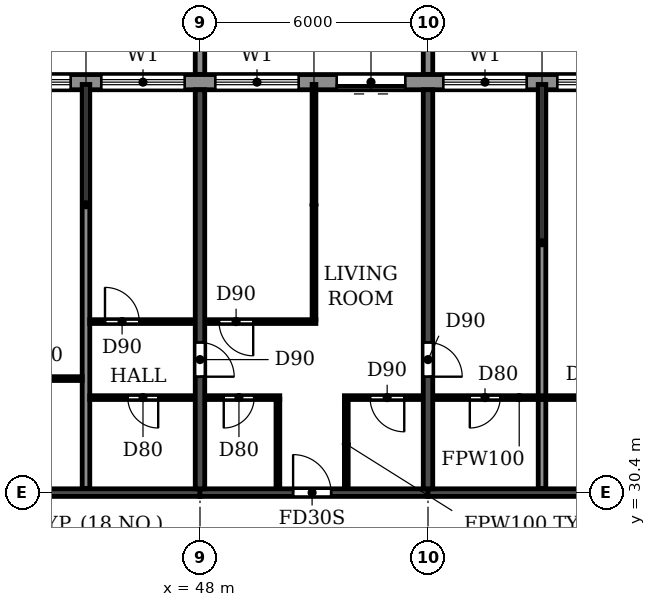
"""IFC4 building model, lengths in metres.
Left out: names, types, materials, properties, quantities, classifications, styles, units other than length and angle.
Written with IfcOpenShell. Run it as: python <this file> out.ifc"""

import sys

from ifc_helpers import new_model, si_unit, direction, frame, frame_2d, origin, place, context, subcontext, project, spatial, polyline, rectangle, outline, extrude, source, transform, mapped, element, fill, save


model = new_model("IFC4")
c1 = context("Model", 3, precision=1e-05, world=origin(), true_north=direction((0.0, 1.0)))
c2 = subcontext(c1, "Body", "Model", "MODEL_VIEW")
j1 = project(units=[si_unit("LENGTHUNIT", "METRE"), si_unit("PLANEANGLEUNIT", "RADIAN")], contexts=[c1])
p1 = place(None, origin())
s1 = spatial("IfcSite", under=j1, at=p1, CompositionType="ELEMENT")
p2 = place(p1, origin())
s2 = spatial("IfcBuilding", under=s1, at=p2, CompositionType="ELEMENT")
p3 = place(p2, frame((0.0, 0.0, 201.6)))
s3 = spatial("IfcBuildingStorey", under=s2, at=p3, CompositionType="ELEMENT", Elevation=201.6)
p4 = place(p3, frame((48.0, 30.5, 0.0), z_axis=(0.0, 0.0, 1.0), x_axis=(0.0, 1.0, 0.0)))
e1 = element("IfcWall", 1, at=p4, inside=s3, PredefinedType="SHEAR", context=c2, shape_type="SweptSolid", body=[
    extrude(rectangle(XDim=10.5, YDim=0.25, at=frame_2d((5.25, 0.0))), origin(), (0.0, 0.0, 1.0), 3.08),
])
p5 = place(p4, frame((2.95, 0.0, 0.0)))
e2 = element("IfcOpeningElement", 2, at=p5, cuts=e1, PredefinedType="OPENING", context=c2, shape_type="SweptSolid", body=[
    extrude(rectangle(XDim=0.9, YDim=2.1, at=frame_2d((0.45, 1.05))), frame((0.0, 0.135, 0.0), z_axis=(0.0, -1.0, 0.0), x_axis=(1.0, 0.0, 0.0)), (0.0, 0.0, 1.0), 0.27),
])
p6 = place(p3, frame((54.0, 30.5, 0.0), z_axis=(0.0, 0.0, 1.0), x_axis=(0.0, 1.0, 0.0)))
e3 = element("IfcWall", 3, at=p6, inside=s3, PredefinedType="SHEAR", context=c2, shape_type="SweptSolid", body=[
    extrude(rectangle(XDim=10.5, YDim=0.25, at=frame_2d((5.25, 0.0))), origin(), (0.0, 0.0, 1.0), 3.08),
])
p7 = place(p6, frame((2.95, 0.0, 0.0)))
e4 = element("IfcOpeningElement", 4, at=p7, cuts=e3, PredefinedType="OPENING", context=c2, shape_type="SweptSolid", body=[
    extrude(rectangle(XDim=0.9, YDim=2.1, at=frame_2d((0.45, 1.05))), frame((0.0, 0.135, 0.0), z_axis=(0.0, -1.0, 0.0), x_axis=(1.0, 0.0, 0.0)), (0.0, 0.0, 1.0), 0.27),
])
p8 = place(p3, frame((42.0, 30.4, 0.0), z_axis=(0.0, 0.0, 1.0), x_axis=(1.0, 0.0, 0.0)))
e5 = element("IfcWall", 5, at=p8, inside=s3, PredefinedType="SHEAR", context=c2, shape_type="SweptSolid", body=[
    extrude(rectangle(XDim=6.0, YDim=0.2, at=frame_2d((3.0, 0.0))), origin(), (0.0, 0.0, 1.0), 2.48),
])
p9 = place(p3, frame((48.0, 30.4, 0.0), z_axis=(0.0, 0.0, 1.0), x_axis=(1.0, 0.0, 0.0)))
e6 = element("IfcWall", 6, at=p9, inside=s3, PredefinedType="SHEAR", context=c2, shape_type="SweptSolid", body=[
    extrude(rectangle(XDim=6.0, YDim=0.2, at=frame_2d((3.0, 0.0))), origin(), (0.0, 0.0, 1.0), 2.48),
])
p10 = place(p9, frame((2.45, 0.0, 0.0)))
e7 = element("IfcOpeningElement", 7, at=p10, cuts=e6, PredefinedType="OPENING", context=c2, shape_type="SweptSolid", body=[
    extrude(rectangle(XDim=1.0, YDim=2.1, at=frame_2d((0.5, 1.05))), frame((0.0, 0.11, 0.0), z_axis=(0.0, -1.0, 0.0), x_axis=(1.0, 0.0, 0.0)), (0.0, 0.0, 1.0), 0.22),
])
p11 = place(p3, frame((54.0, 30.4, 0.0), z_axis=(0.0, 0.0, 1.0), x_axis=(1.0, 0.0, 0.0)))
e8 = element("IfcWall", 8, at=p11, inside=s3, PredefinedType="SHEAR", context=c2, shape_type="SweptSolid", body=[
    extrude(rectangle(XDim=6.0, YDim=0.2, at=frame_2d((3.0, 0.0))), origin(), (0.0, 0.0, 1.0), 2.48),
])
p12 = place(p3, frame((79.317, 41.2, 0.0), z_axis=(0.0, 0.0, 1.0), x_axis=(-1.0, 0.0, 0.0)))
e9 = element("IfcWall", 9, at=p12, inside=s3, PredefinedType="STANDARD", context=c2, shape_type="SweptSolid", body=[
    extrude(rectangle(XDim=56.634, YDim=0.4, at=frame_2d((28.317, 0.0))), origin(), (0.0, 0.0, 1.0), 3.08),
])
p13 = place(p12, frame((52.717, 0.0, 0.9)))
e10 = element("IfcOpeningElement", 10, at=p13, cuts=e9, PredefinedType="OPENING", context=c2, shape_type="SweptSolid", body=[
    extrude(rectangle(XDim=2.2, YDim=1.5, at=frame_2d((1.1, 0.75))), frame((0.0, 0.21, 0.0), z_axis=(0.0, -1.0, 0.0), x_axis=(1.0, 0.0, 0.0)), (0.0, 0.0, 1.0), 0.42),
])
p14 = place(p12, frame((49.917, 0.0, 0.0)))
e11 = element("IfcOpeningElement", 11, at=p14, cuts=e9, PredefinedType="OPENING", context=c2, shape_type="SweptSolid", body=[
    extrude(rectangle(XDim=1.8, YDim=2.4, at=frame_2d((0.9, 1.2))), frame((0.0, 0.21, 0.0), z_axis=(0.0, -1.0, 0.0), x_axis=(1.0, 0.0, 0.0)), (0.0, 0.0, 1.0), 0.42),
])
p15 = place(p12, frame((46.717, 0.0, 0.9)))
e12 = element("IfcOpeningElement", 12, at=p15, cuts=e9, PredefinedType="OPENING", context=c2, shape_type="SweptSolid", body=[
    extrude(rectangle(XDim=2.2, YDim=1.5, at=frame_2d((1.1, 0.75))), frame((0.0, 0.21, 0.0), z_axis=(0.0, -1.0, 0.0), x_axis=(1.0, 0.0, 0.0)), (0.0, 0.0, 1.0), 0.42),
])
p16 = place(p12, frame((43.917, 0.0, 0.0)))
e13 = element("IfcOpeningElement", 13, at=p16, cuts=e9, PredefinedType="OPENING", context=c2, shape_type="SweptSolid", body=[
    extrude(rectangle(XDim=1.8, YDim=2.4, at=frame_2d((0.9, 1.2))), frame((0.0, 0.21, 0.0), z_axis=(0.0, -1.0, 0.0), x_axis=(1.0, 0.0, 0.0)), (0.0, 0.0, 1.0), 0.42),
])
p17 = place(p12, frame((40.917, 0.0, 0.0)))
e14 = element("IfcOpeningElement", 14, at=p17, cuts=e9, PredefinedType="OPENING", context=c2, shape_type="SweptSolid", body=[
    extrude(rectangle(XDim=1.8, YDim=2.4, at=frame_2d((0.9, 1.2))), frame((0.0, 0.21, 0.0), z_axis=(0.0, -1.0, 0.0), x_axis=(1.0, 0.0, 0.0)), (0.0, 0.0, 1.0), 0.42),
])
p18 = place(p12, frame((37.717, 0.0, 0.9)))
e15 = element("IfcOpeningElement", 15, at=p18, cuts=e9, PredefinedType="OPENING", context=c2, shape_type="SweptSolid", body=[
    extrude(rectangle(XDim=2.2, YDim=1.5, at=frame_2d((1.1, 0.75))), frame((0.0, 0.21, 0.0), z_axis=(0.0, -1.0, 0.0), x_axis=(1.0, 0.0, 0.0)), (0.0, 0.0, 1.0), 0.42),
])
p19 = place(p12, frame((34.717, 0.0, 0.9)))
e16 = element("IfcOpeningElement", 16, at=p19, cuts=e9, PredefinedType="OPENING", context=c2, shape_type="SweptSolid", body=[
    extrude(rectangle(XDim=2.2, YDim=1.5, at=frame_2d((1.1, 0.75))), frame((0.0, 0.21, 0.0), z_axis=(0.0, -1.0, 0.0), x_axis=(1.0, 0.0, 0.0)), (0.0, 0.0, 1.0), 0.42),
])
p20 = place(p12, frame((31.717, 0.0, 0.9)))
e17 = element("IfcOpeningElement", 17, at=p20, cuts=e9, PredefinedType="OPENING", context=c2, shape_type="SweptSolid", body=[
    extrude(rectangle(XDim=2.2, YDim=1.5, at=frame_2d((1.1, 0.75))), frame((0.0, 0.21, 0.0), z_axis=(0.0, -1.0, 0.0), x_axis=(1.0, 0.0, 0.0)), (0.0, 0.0, 1.0), 0.42),
])
p21 = place(p12, frame((28.717, 0.0, 0.9)))
e18 = element("IfcOpeningElement", 18, at=p21, cuts=e9, PredefinedType="OPENING", context=c2, shape_type="SweptSolid", body=[
    extrude(rectangle(XDim=2.2, YDim=1.5, at=frame_2d((1.1, 0.75))), frame((0.0, 0.21, 0.0), z_axis=(0.0, -1.0, 0.0), x_axis=(1.0, 0.0, 0.0)), (0.0, 0.0, 1.0), 0.42),
])
p22 = place(p12, frame((25.917, 0.0, 0.0)))
e19 = element("IfcOpeningElement", 19, at=p22, cuts=e9, PredefinedType="OPENING", context=c2, shape_type="SweptSolid", body=[
    extrude(rectangle(XDim=1.8, YDim=2.4, at=frame_2d((0.9, 1.2))), frame((0.0, 0.21, 0.0), z_axis=(0.0, -1.0, 0.0), x_axis=(1.0, 0.0, 0.0)), (0.0, 0.0, 1.0), 0.42),
])
p23 = place(p12, frame((22.717, 0.0, 0.9)))
e20 = element("IfcOpeningElement", 20, at=p23, cuts=e9, PredefinedType="OPENING", context=c2, shape_type="SweptSolid", body=[
    extrude(rectangle(XDim=2.2, YDim=1.5, at=frame_2d((1.1, 0.75))), frame((0.0, 0.21, 0.0), z_axis=(0.0, -1.0, 0.0), x_axis=(1.0, 0.0, 0.0)), (0.0, 0.0, 1.0), 0.42),
])
p24 = place(p12, frame((19.717, 0.0, 0.9)))
e21 = element("IfcOpeningElement", 21, at=p24, cuts=e9, PredefinedType="OPENING", context=c2, shape_type="SweptSolid", body=[
    extrude(rectangle(XDim=2.2, YDim=1.5, at=frame_2d((1.1, 0.75))), frame((0.0, 0.21, 0.0), z_axis=(0.0, -1.0, 0.0), x_axis=(1.0, 0.0, 0.0)), (0.0, 0.0, 1.0), 0.42),
])
p25 = place(p12, frame((16.917, 0.0, 0.0)))
e22 = element("IfcOpeningElement", 22, at=p25, cuts=e9, PredefinedType="OPENING", context=c2, shape_type="SweptSolid", body=[
    extrude(rectangle(XDim=1.8, YDim=2.4, at=frame_2d((0.9, 1.2))), frame((0.0, 0.21, 0.0), z_axis=(0.0, -1.0, 0.0), x_axis=(1.0, 0.0, 0.0)), (0.0, 0.0, 1.0), 0.42),
])
p26 = place(p12, frame((13.717, 0.0, 0.9)))
e23 = element("IfcOpeningElement", 23, at=p26, cuts=e9, PredefinedType="OPENING", context=c2, shape_type="SweptSolid", body=[
    extrude(rectangle(XDim=2.2, YDim=1.5, at=frame_2d((1.1, 0.75))), frame((0.0, 0.21, 0.0), z_axis=(0.0, -1.0, 0.0), x_axis=(1.0, 0.0, 0.0)), (0.0, 0.0, 1.0), 0.42),
])
p27 = place(p12, frame((10.717, 0.0, 0.9)))
e24 = element("IfcOpeningElement", 24, at=p27, cuts=e9, PredefinedType="OPENING", context=c2, shape_type="SweptSolid", body=[
    extrude(rectangle(XDim=2.2, YDim=1.5, at=frame_2d((1.1, 0.75))), frame((0.0, 0.21, 0.0), z_axis=(0.0, -1.0, 0.0), x_axis=(1.0, 0.0, 0.0)), (0.0, 0.0, 1.0), 0.42),
])
p28 = place(p12, frame((7.717, 0.0, 0.9)))
e25 = element("IfcOpeningElement", 25, at=p28, cuts=e9, PredefinedType="OPENING", context=c2, shape_type="SweptSolid", body=[
    extrude(rectangle(XDim=2.2, YDim=1.5, at=frame_2d((1.1, 0.75))), frame((0.0, 0.21, 0.0), z_axis=(0.0, -1.0, 0.0), x_axis=(1.0, 0.0, 0.0)), (0.0, 0.0, 1.0), 0.42),
])
p29 = place(p12, frame((4.917, 0.0, 0.0)))
e26 = element("IfcOpeningElement", 26, at=p29, cuts=e9, PredefinedType="OPENING", context=c2, shape_type="SweptSolid", body=[
    extrude(rectangle(XDim=1.8, YDim=2.4, at=frame_2d((0.9, 1.2))), frame((0.0, 0.21, 0.0), z_axis=(0.0, -1.0, 0.0), x_axis=(1.0, 0.0, 0.0)), (0.0, 0.0, 1.0), 0.42),
])
p30 = place(p12, frame((1.717, 0.0, 0.9)))
e27 = element("IfcOpeningElement", 27, at=p30, cuts=e9, PredefinedType="OPENING", context=c2, shape_type="SweptSolid", body=[
    extrude(rectangle(XDim=2.2, YDim=1.5, at=frame_2d((1.1, 0.75))), frame((0.0, 0.21, 0.0), z_axis=(0.0, -1.0, 0.0), x_axis=(1.0, 0.0, 0.0)), (0.0, 0.0, 1.0), 0.42),
])
m1 = source(origin(), c2, "Body", "SweptSolid", [
    extrude(outline(polyline([(0.0, 0.0), (0.25, 0.0), (0.25, 3.1), (0.0, 3.1), (0.0, 0.0)])), origin(), (0.0, 0.0, 1.0), 3.1),
])
for number, where in (
    (28, (47.875, 41.4, 0.0)),
    (29, (53.875, 41.4, 0.0)),
):
    element("IfcWall", number, at=place(p3, frame(where)), inside=s3, PredefinedType="STANDARD", context=c2, shape_type="MappedRepresentation", body=[
        mapped(m1, transform((0.0, 0.0, 0.0))),
    ])
for number, where, z_axis, x_axis in (
    (30, (45.0, 30.51, 0.0), (0.0, 0.0, 1.0), (0.0, 1.0, 0.0)),
    (31, (57.0, 30.51, 0.0), (0.0, 0.0, 1.0), (0.0, 1.0, 0.0)),
):
    element("IfcWall", number, at=place(p3, frame(where, z_axis=z_axis, x_axis=x_axis)), inside=s3, PredefinedType="PARTITIONING", context=c2, shape_type="SweptSolid", body=[
        extrude(rectangle(XDim=10.63, YDim=0.2, at=frame_2d((5.315, 0.0))), origin(), (0.0, 0.0, 1.0), 3.08),
    ])
p31 = place(p3, frame((45.1, 32.9, 0.0), z_axis=(0.0, 0.0, 1.0), x_axis=(1.0, 0.0, 0.0)))
e32 = element("IfcWall", 32, at=p31, inside=s3, PredefinedType="PARTITIONING", context=c2, shape_type="SweptSolid", body=[
    extrude(rectangle(XDim=2.765, YDim=0.1, at=frame_2d((1.382, 0.0))), origin(), (0.0, 0.0, 1.0), 3.08),
])
p32 = place(p31, frame((1.0, 0.0, 0.0)))
e33 = element("IfcOpeningElement", 33, at=p32, cuts=e32, PredefinedType="OPENING", context=c2, shape_type="SweptSolid", body=[
    extrude(rectangle(XDim=0.8, YDim=2.1, at=frame_2d((0.4, 1.05))), frame((0.0, 0.06, 0.0), z_axis=(0.0, -1.0, 0.0), x_axis=(1.0, 0.0, 0.0)), (0.0, 0.0, 1.0), 0.12),
])
p33 = place(p3, frame((48.135, 32.9, 0.0), z_axis=(0.0, 0.0, 1.0), x_axis=(1.0, 0.0, 0.0)))
e34 = element("IfcWall", 34, at=p33, inside=s3, PredefinedType="PARTITIONING", context=c2, shape_type="SweptSolid", body=[
    extrude(rectangle(XDim=1.965, YDim=0.1, at=frame_2d((0.982, 0.0))), origin(), (0.0, 0.0, 1.0), 3.08),
])
p34 = place(p33, frame((0.49, 0.0, 0.0)))
e35 = element("IfcOpeningElement", 35, at=p34, cuts=e34, PredefinedType="OPENING", context=c2, shape_type="SweptSolid", body=[
    extrude(rectangle(XDim=0.8, YDim=2.1, at=frame_2d((0.4, 1.05))), frame((0.0, 0.06, 0.0), z_axis=(0.0, -1.0, 0.0), x_axis=(1.0, 0.0, 0.0)), (0.0, 0.0, 1.0), 0.12),
])
p35 = place(p3, frame((51.8, 32.9, 0.0), z_axis=(0.0, 0.0, 1.0), x_axis=(1.0, 0.0, 0.0)))
e36 = element("IfcWall", 36, at=p35, inside=s3, PredefinedType="PARTITIONING", context=c2, shape_type="SweptSolid", body=[
    extrude(rectangle(XDim=2.065, YDim=0.1, at=frame_2d((1.032, 0.0))), origin(), (0.0, 0.0, 1.0), 3.08),
])
p36 = place(p35, frame((0.675, 0.0, 0.0)))
e37 = element("IfcOpeningElement", 37, at=p36, cuts=e36, PredefinedType="OPENING", context=c2, shape_type="SweptSolid", body=[
    extrude(rectangle(XDim=0.9, YDim=2.1, at=frame_2d((0.45, 1.05))), frame((0.0, 0.06, 0.0), z_axis=(0.0, -1.0, 0.0), x_axis=(1.0, 0.0, 0.0)), (0.0, 0.0, 1.0), 0.12),
])
p37 = place(p3, frame((54.135, 32.9, 0.0), z_axis=(0.0, 0.0, 1.0), x_axis=(1.0, 0.0, 0.0)))
e38 = element("IfcWall", 38, at=p37, inside=s3, PredefinedType="PARTITIONING", context=c2, shape_type="SweptSolid", body=[
    extrude(rectangle(XDim=5.73, YDim=0.1, at=frame_2d((2.865, 0.0))), origin(), (0.0, 0.0, 1.0), 3.08),
])
p38 = place(p37, frame((0.965, 0.0, 0.0)))
e39 = element("IfcOpeningElement", 39, at=p38, cuts=e38, PredefinedType="OPENING", context=c2, shape_type="SweptSolid", body=[
    extrude(rectangle(XDim=0.8, YDim=2.1, at=frame_2d((0.4, 1.05))), frame((0.0, 0.06, 0.0), z_axis=(0.0, -1.0, 0.0), x_axis=(1.0, 0.0, 0.0)), (0.0, 0.0, 1.0), 0.12),
])
p39 = place(p37, frame((3.965, 0.0, 0.0)))
e40 = element("IfcOpeningElement", 40, at=p39, cuts=e38, PredefinedType="OPENING", context=c2, shape_type="SweptSolid", body=[
    extrude(rectangle(XDim=0.8, YDim=2.1, at=frame_2d((0.4, 1.05))), frame((0.0, 0.06, 0.0), z_axis=(0.0, -1.0, 0.0), x_axis=(1.0, 0.0, 0.0)), (0.0, 0.0, 1.0), 0.12),
])
p40 = place(p3, frame((42.135, 33.4, 0.0), z_axis=(0.0, 0.0, 1.0), x_axis=(1.0, 0.0, 0.0)))
e41 = element("IfcWall", 41, at=p40, inside=s3, PredefinedType="PARTITIONING", context=c2, shape_type="SweptSolid", body=[
    extrude(rectangle(XDim=2.765, YDim=0.1, at=frame_2d((1.382, 0.0))), origin(), (0.0, 0.0, 1.0), 3.08),
])
p41 = place(p40, frame((0.965, 0.0, 0.0)))
e42 = element("IfcOpeningElement", 42, at=p41, cuts=e41, PredefinedType="OPENING", context=c2, shape_type="SweptSolid", body=[
    extrude(rectangle(XDim=0.8, YDim=2.1, at=frame_2d((0.4, 1.05))), frame((0.0, 0.06, 0.0), z_axis=(0.0, -1.0, 0.0), x_axis=(1.0, 0.0, 0.0)), (0.0, 0.0, 1.0), 0.12),
])
p42 = place(p3, frame((45.1, 34.9, 0.0), z_axis=(0.0, 0.0, 1.0), x_axis=(1.0, 0.0, 0.0)))
e43 = element("IfcWall", 43, at=p42, inside=s3, PredefinedType="PARTITIONING", context=c2, shape_type="SweptSolid", body=[
    extrude(rectangle(XDim=2.765, YDim=0.1, at=frame_2d((1.382, 0.0))), origin(), (0.0, 0.0, 1.0), 3.08),
])
p43 = place(p42, frame((0.4, 0.0, 0.0)))
e44 = element("IfcOpeningElement", 44, at=p43, cuts=e43, PredefinedType="OPENING", context=c2, shape_type="SweptSolid", body=[
    extrude(rectangle(XDim=0.9, YDim=2.1, at=frame_2d((0.45, 1.05))), frame((0.0, 0.06, 0.0), z_axis=(0.0, -1.0, 0.0), x_axis=(1.0, 0.0, 0.0)), (0.0, 0.0, 1.0), 0.12),
])
p44 = place(p3, frame((48.135, 34.9, 0.0), z_axis=(0.0, 0.0, 1.0), x_axis=(1.0, 0.0, 0.0)))
e45 = element("IfcWall", 45, at=p44, inside=s3, PredefinedType="PARTITIONING", context=c2, shape_type="SweptSolid", body=[
    extrude(rectangle(XDim=2.915, YDim=0.1, at=frame_2d((1.458, 0.0))), origin(), (0.0, 0.0, 1.0), 3.08),
])
p45 = place(p44, frame((0.365, 0.0, 0.0)))
e46 = element("IfcOpeningElement", 46, at=p45, cuts=e45, PredefinedType="OPENING", context=c2, shape_type="SweptSolid", body=[
    extrude(rectangle(XDim=0.9, YDim=2.1, at=frame_2d((0.45, 1.05))), frame((0.0, 0.06, 0.0), z_axis=(0.0, -1.0, 0.0), x_axis=(1.0, 0.0, 0.0)), (0.0, 0.0, 1.0), 0.12),
])
p46 = place(p3, frame((50.05, 30.51, 0.0), z_axis=(0.0, 0.0, 1.0), x_axis=(0.0, 1.0, 0.0)))
e47 = element("IfcWall", 47, at=p46, inside=s3, PredefinedType="PARTITIONING", context=c2, shape_type="SweptSolid", body=[
    extrude(rectangle(XDim=2.34, YDim=0.1, at=frame_2d((1.17, 0.0))), origin(), (0.0, 0.0, 1.0), 3.08),
])
p47 = place(p3, frame((51.0, 34.95, 0.0), z_axis=(0.0, 0.0, 1.0), x_axis=(0.0, 1.0, 0.0)))
e48 = element("IfcWall", 48, at=p47, inside=s3, PredefinedType="PARTITIONING", context=c2, shape_type="SweptSolid", body=[
    extrude(rectangle(XDim=6.19, YDim=0.1, at=frame_2d((3.095, 0.0))), origin(), (0.0, 0.0, 1.0), 3.08),
])
p48 = place(p3, frame((51.85, 30.51, 0.0), z_axis=(0.0, 0.0, 1.0), x_axis=(0.0, 1.0, 0.0)))
e49 = element("IfcWall", 49, at=p48, inside=s3, PredefinedType="PARTITIONING", context=c2, shape_type="SweptSolid", body=[
    extrude(rectangle(XDim=2.34, YDim=0.1, at=frame_2d((1.17, 0.0))), origin(), (0.0, 0.0, 1.0), 3.08),
])
p49 = place(p19, origin())
e50 = element("IfcWindow", 50, at=p49, inside=s3, PartitioningType="DOUBLE_PANEL_HORIZONTAL", PredefinedType="WINDOW", context=c2, shape_type="SweptSolid", body=[
    extrude(rectangle(XDim=2.2, YDim=1.5, at=frame_2d((1.1, 0.75))), frame((0.0, 0.03, 0.0), z_axis=(0.0, -1.0, 0.0), x_axis=(1.0, 0.0, 0.0)), (0.0, 0.0, 1.0), 0.06),
])
fill(e16, e50)
p50 = place(p20, origin())
e51 = element("IfcWindow", 51, at=p50, inside=s3, PartitioningType="DOUBLE_PANEL_HORIZONTAL", PredefinedType="WINDOW", context=c2, shape_type="SweptSolid", body=[
    extrude(rectangle(XDim=2.2, YDim=1.5, at=frame_2d((1.1, 0.75))), frame((0.0, 0.03, 0.0), z_axis=(0.0, -1.0, 0.0), x_axis=(1.0, 0.0, 0.0)), (0.0, 0.0, 1.0), 0.06),
])
fill(e17, e51)
p51 = place(p21, origin())
e52 = element("IfcWindow", 52, at=p51, inside=s3, PartitioningType="DOUBLE_PANEL_HORIZONTAL", PredefinedType="WINDOW", context=c2, shape_type="SweptSolid", body=[
    extrude(rectangle(XDim=2.2, YDim=1.5, at=frame_2d((1.1, 0.75))), frame((0.0, 0.03, 0.0), z_axis=(0.0, -1.0, 0.0), x_axis=(1.0, 0.0, 0.0)), (0.0, 0.0, 1.0), 0.06),
])
fill(e18, e52)
p52 = place(p22, origin())
e53 = element("IfcDoor", 53, at=p52, inside=s3, OperationType="DOUBLE_DOOR_SLIDING", PredefinedType="DOOR", context=c2, shape_type="SweptSolid", body=[
    extrude(rectangle(XDim=1.8, YDim=2.4, at=frame_2d((0.9, 1.2))), frame((0.0, 0.025, 0.0), z_axis=(0.0, -1.0, 0.0), x_axis=(1.0, 0.0, 0.0)), (0.0, 0.0, 1.0), 0.05),
])
fill(e19, e53)
p53 = place(p23, origin())
e54 = element("IfcWindow", 54, at=p53, inside=s3, PartitioningType="DOUBLE_PANEL_HORIZONTAL", PredefinedType="WINDOW", context=c2, shape_type="SweptSolid", body=[
    extrude(rectangle(XDim=2.2, YDim=1.5, at=frame_2d((1.1, 0.75))), frame((0.0, 0.03, 0.0), z_axis=(0.0, -1.0, 0.0), x_axis=(1.0, 0.0, 0.0)), (0.0, 0.0, 1.0), 0.06),
])
fill(e20, e54)
p54 = place(p24, origin())
e55 = element("IfcWindow", 55, at=p54, inside=s3, PartitioningType="DOUBLE_PANEL_HORIZONTAL", PredefinedType="WINDOW", context=c2, shape_type="SweptSolid", body=[
    extrude(rectangle(XDim=2.2, YDim=1.5, at=frame_2d((1.1, 0.75))), frame((0.0, 0.03, 0.0), z_axis=(0.0, -1.0, 0.0), x_axis=(1.0, 0.0, 0.0)), (0.0, 0.0, 1.0), 0.06),
])
fill(e21, e55)
p55 = place(p38, frame((0.8, 0.0, 0.0), z_axis=(0.0, 0.0, 1.0), x_axis=(-1.0, 0.0, 0.0)))
e56 = element("IfcDoor", 56, at=p55, inside=s3, OperationType="SINGLE_SWING_RIGHT", PredefinedType="DOOR", context=c2, shape_type="SweptSolid", body=[
    extrude(rectangle(XDim=0.8, YDim=2.1, at=frame_2d((0.4, 1.05))), frame((0.0, 0.025, 0.0), z_axis=(0.0, -1.0, 0.0), x_axis=(1.0, 0.0, 0.0)), (0.0, 0.0, 1.0), 0.05),
])
fill(e39, e56)
p56 = place(p43, origin())
e57 = element("IfcDoor", 57, at=p56, inside=s3, OperationType="SINGLE_SWING_LEFT", PredefinedType="DOOR", context=c2, shape_type="SweptSolid", body=[
    extrude(rectangle(XDim=0.9, YDim=2.1, at=frame_2d((0.45, 1.05))), frame((0.0, 0.025, 0.0), z_axis=(0.0, -1.0, 0.0), x_axis=(1.0, 0.0, 0.0)), (0.0, 0.0, 1.0), 0.05),
])
fill(e44, e57)
p57 = place(p32, frame((0.8, 0.0, 0.0), z_axis=(0.0, 0.0, 1.0), x_axis=(-1.0, 0.0, 0.0)))
e58 = element("IfcDoor", 58, at=p57, inside=s3, OperationType="SINGLE_SWING_LEFT", PredefinedType="DOOR", context=c2, shape_type="SweptSolid", body=[
    extrude(rectangle(XDim=0.8, YDim=2.1, at=frame_2d((0.4, 1.05))), frame((0.0, 0.025, 0.0), z_axis=(0.0, -1.0, 0.0), x_axis=(1.0, 0.0, 0.0)), (0.0, 0.0, 1.0), 0.05),
])
fill(e33, e58)
p58 = place(p5, frame((0.9, 0.0, 0.0), z_axis=(0.0, 0.0, 1.0), x_axis=(-1.0, 0.0, 0.0)))
e59 = element("IfcDoor", 59, at=p58, inside=s3, OperationType="SINGLE_SWING_RIGHT", PredefinedType="DOOR", context=c2, shape_type="SweptSolid", body=[
    extrude(rectangle(XDim=0.9, YDim=2.1, at=frame_2d((0.45, 1.05))), frame((0.0, 0.025, 0.0), z_axis=(0.0, -1.0, 0.0), x_axis=(1.0, 0.0, 0.0)), (0.0, 0.0, 1.0), 0.05),
])
fill(e2, e59)
p59 = place(p45, frame((0.9, 0.0, 0.0), z_axis=(0.0, 0.0, 1.0), x_axis=(-1.0, 0.0, 0.0)))
e60 = element("IfcDoor", 60, at=p59, inside=s3, OperationType="SINGLE_SWING_LEFT", PredefinedType="DOOR", context=c2, shape_type="SweptSolid", body=[
    extrude(rectangle(XDim=0.9, YDim=2.1, at=frame_2d((0.45, 1.05))), frame((0.0, 0.025, 0.0), z_axis=(0.0, -1.0, 0.0), x_axis=(1.0, 0.0, 0.0)), (0.0, 0.0, 1.0), 0.05),
])
fill(e46, e60)
p60 = place(p34, frame((0.8, 0.0, 0.0), z_axis=(0.0, 0.0, 1.0), x_axis=(-1.0, 0.0, 0.0)))
e61 = element("IfcDoor", 61, at=p60, inside=s3, OperationType="SINGLE_SWING_RIGHT", PredefinedType="DOOR", context=c2, shape_type="SweptSolid", body=[
    extrude(rectangle(XDim=0.8, YDim=2.1, at=frame_2d((0.4, 1.05))), frame((0.0, 0.025, 0.0), z_axis=(0.0, -1.0, 0.0), x_axis=(1.0, 0.0, 0.0)), (0.0, 0.0, 1.0), 0.05),
])
fill(e35, e61)
p61 = place(p10, origin())
e62 = element("IfcDoor", 62, at=p61, inside=s3, OperationType="SINGLE_SWING_LEFT", PredefinedType="DOOR", context=c2, shape_type="SweptSolid", body=[
    extrude(rectangle(XDim=1.0, YDim=2.1, at=frame_2d((0.5, 1.05))), frame((0.0, 0.025, 0.0), z_axis=(0.0, -1.0, 0.0), x_axis=(1.0, 0.0, 0.0)), (0.0, 0.0, 1.0), 0.05),
])
fill(e7, e62)
p62 = place(p36, frame((0.9, 0.0, 0.0), z_axis=(0.0, 0.0, 1.0), x_axis=(-1.0, 0.0, 0.0)))
e63 = element("IfcDoor", 63, at=p62, inside=s3, OperationType="SINGLE_SWING_LEFT", PredefinedType="DOOR", context=c2, shape_type="SweptSolid", body=[
    extrude(rectangle(XDim=0.9, YDim=2.1, at=frame_2d((0.45, 1.05))), frame((0.0, 0.025, 0.0), z_axis=(0.0, -1.0, 0.0), x_axis=(1.0, 0.0, 0.0)), (0.0, 0.0, 1.0), 0.05),
])
fill(e37, e63)
p63 = place(p7, frame((0.9, 0.0, 0.0), z_axis=(0.0, 0.0, 1.0), x_axis=(-1.0, 0.0, 0.0)))
e64 = element("IfcDoor", 64, at=p63, inside=s3, OperationType="SINGLE_SWING_RIGHT", PredefinedType="DOOR", context=c2, shape_type="SweptSolid", body=[
    extrude(rectangle(XDim=0.9, YDim=2.1, at=frame_2d((0.45, 1.05))), frame((0.0, 0.025, 0.0), z_axis=(0.0, -1.0, 0.0), x_axis=(1.0, 0.0, 0.0)), (0.0, 0.0, 1.0), 0.05),
])
fill(e4, e64)
save(model, sys.argv[1])
